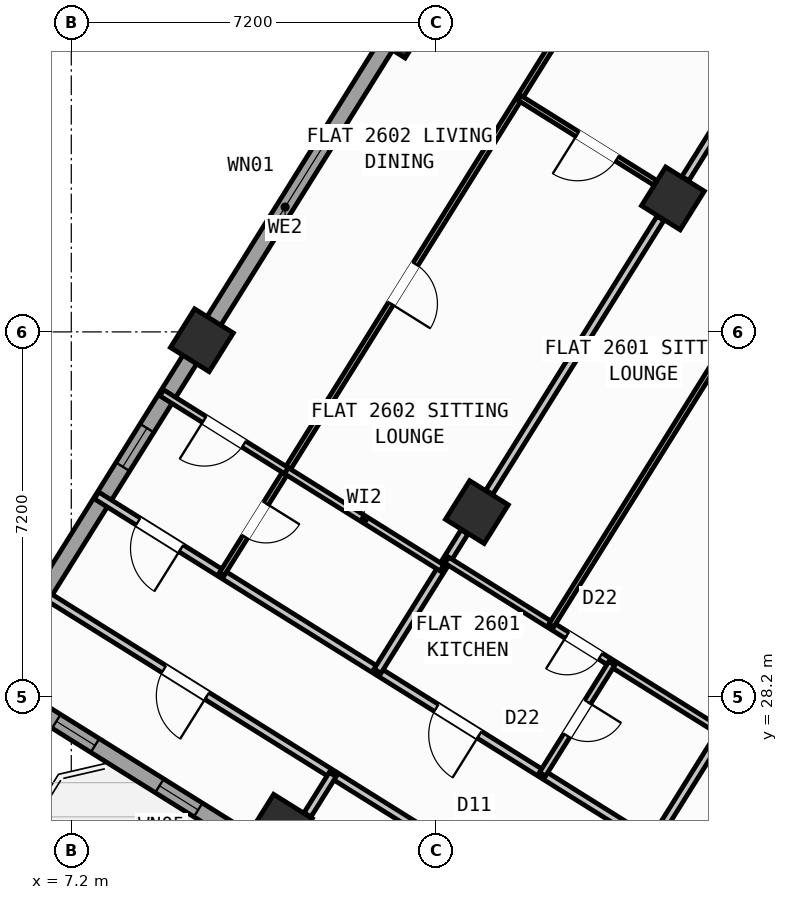
"""IFC4 building model, lengths in metres.
Left out: names, types, materials, properties, quantities, classifications, styles, units other than length and angle.
Written with IfcOpenShell. Run it as: python <this file> out.ifc"""

import sys

from ifc_helpers import new_model, si_unit, direction, frame, frame_2d, origin, origin_2d, place, context, subcontext, project, spatial, rectangle, hollow_rectangle, extrude, source, transform, mapped, element, fill, save


model = new_model("IFC4")
c1 = context("Model", 3, precision=1e-05, world=origin(), true_north=direction((0.0, 1.0)))
c2 = subcontext(c1, "Body", "Model", "MODEL_VIEW")
j1 = project(units=[si_unit("LENGTHUNIT", "METRE"), si_unit("PLANEANGLEUNIT", "RADIAN")], contexts=[c1])
p1 = place(None, origin())
s1 = spatial("IfcSite", under=j1, at=p1, CompositionType="ELEMENT")
p2 = place(p1, origin())
s2 = spatial("IfcBuilding", under=s1, at=p2, CompositionType="ELEMENT")
p3 = place(p2, frame((0.0, 0.0, 105.3)))
s3 = spatial("IfcBuildingStorey", under=s2, at=p3, CompositionType="ELEMENT", Elevation=105.3)
m1 = source(origin(), c2, "Body", "SweptSolid", [
    extrude(hollow_rectangle(XDim=0.9, YDim=0.9, WallThickness=0.036, at=origin_2d()), origin(), (0.0, 0.0, 1.0), 3.6),
])
for number, where, z_axis, x_axis in (
    (1, (19.073, 38.034, 0.0), (0.0, 0.0, 1.0), (-0.848, 0.53, 0.0)),
    (2, (15.205, 31.844, 0.0), (0.0, 0.0, 1.0), (-0.848, 0.53, 0.0)),
    (3, (11.336, 25.653, 0.0), (0.0, 0.0, 1.0), (-0.848, 0.53, 0.0)),
    (4, (13.646, 41.426, 0.0), (0.0, 0.0, 1.0), (-0.848, 0.53, 0.0)),
    (5, (9.777, 35.235, 0.0), (0.0, 0.0, 1.0), (-0.848, 0.53, 0.0)),
):
    element("IfcColumn", number, at=place(p3, frame(where, z_axis=z_axis, x_axis=x_axis)), inside=s3, PredefinedType="COLUMN", context=c2, shape_type="MappedRepresentation", body=[
        mapped(m1, transform((0.0, 0.0, 0.0), scale=1.0)),
    ])
p4 = place(p3, frame((31.76, 12.183, 0.0), z_axis=(0.0, 0.0, 1.0), x_axis=(-0.848047074256, 0.529920899612, 0.0)))
e6 = element("IfcWall", 6, at=p4, inside=s3, PredefinedType="STANDARD", context=c2, shape_type="SweptSolid", body=[
    extrude(rectangle(XDim=30.652, YDim=0.32, at=frame_2d((15.326, 0.0))), origin(), (0.0, 0.0, 1.0), 3.35),
])
p5 = place(p4, frame((15.153, 0.0, 0.0)))
e7 = element("IfcOpeningElement", 7, at=p5, cuts=e6, PredefinedType="OPENING", context=c2, shape_type="SweptSolid", body=[
    extrude(rectangle(XDim=1.2, YDim=2.15, at=frame_2d((0.6, 1.075))), frame((0.0, 0.17, 0.0), z_axis=(0.0, -1.0, 0.0), x_axis=(1.0, 0.0, 0.0)), (0.0, 0.0, 1.0), 0.34),
])
p6 = place(p4, frame((2.002, 0.0, 0.8)))
e8 = element("IfcOpeningElement", 8, at=p6, cuts=e6, PredefinedType="OPENING", context=c2, shape_type="SweptSolid", body=[
    extrude(rectangle(XDim=2.1, YDim=1.55, at=frame_2d((1.05, 0.775))), frame((0.0, 0.17, 0.0), z_axis=(0.0, -1.0, 0.0), x_axis=(1.0, 0.0, 0.0)), (0.0, 0.0, 1.0), 0.34),
])
p7 = place(p4, frame((7.206, 0.0, 0.8)))
e9 = element("IfcOpeningElement", 9, at=p7, cuts=e6, PredefinedType="OPENING", context=c2, shape_type="SweptSolid", body=[
    extrude(rectangle(XDim=2.1, YDim=1.55, at=frame_2d((1.05, 0.775))), frame((0.0, 0.17, 0.0), z_axis=(0.0, -1.0, 0.0), x_axis=(1.0, 0.0, 0.0)), (0.0, 0.0, 1.0), 0.34),
])
p8 = place(p4, frame((12.648, 0.0, 1.0)))
e10 = element("IfcOpeningElement", 10, at=p8, cuts=e6, PredefinedType="OPENING", context=c2, shape_type="SweptSolid", body=[
    extrude(rectangle(XDim=0.9, YDim=1.25, at=frame_2d((0.45, 0.625))), frame((0.0, 0.17, 0.0), z_axis=(0.0, -1.0, 0.0), x_axis=(1.0, 0.0, 0.0)), (0.0, 0.0, 1.0), 0.34),
])
p9 = place(p4, frame((20.628, 0.0, 0.95)))
e11 = element("IfcOpeningElement", 11, at=p9, cuts=e6, PredefinedType="OPENING", context=c2, shape_type="SweptSolid", body=[
    extrude(rectangle(XDim=1.2, YDim=1.4, at=frame_2d((0.6, 0.7))), frame((0.0, 0.17, 0.0), z_axis=(0.0, -1.0, 0.0), x_axis=(1.0, 0.0, 0.0)), (0.0, 0.0, 1.0), 0.34),
])
p10 = place(p4, frame((26.008, 0.0, 1.0)))
e12 = element("IfcOpeningElement", 12, at=p10, cuts=e6, PredefinedType="OPENING", context=c2, shape_type="SweptSolid", body=[
    extrude(rectangle(XDim=0.9, YDim=1.25, at=frame_2d((0.45, 0.625))), frame((0.0, 0.17, 0.0), z_axis=(0.0, -1.0, 0.0), x_axis=(1.0, 0.0, 0.0)), (0.0, 0.0, 1.0), 0.34),
])
p11 = place(p4, frame((28.408, 0.0, 1.0)))
e13 = element("IfcOpeningElement", 13, at=p11, cuts=e6, PredefinedType="OPENING", context=c2, shape_type="SweptSolid", body=[
    extrude(rectangle(XDim=0.9, YDim=1.25, at=frame_2d((0.45, 0.625))), frame((0.0, 0.17, 0.0), z_axis=(0.0, -1.0, 0.0), x_axis=(1.0, 0.0, 0.0)), (0.0, 0.0, 1.0), 0.34),
])
p12 = place(p3, frame((5.7, 28.71, 0.0), z_axis=(0.0, 0.0, 1.0), x_axis=(0.529923711467, 0.8480453172, 0.0)))
e14 = element("IfcWall", 14, at=p12, inside=s3, PredefinedType="STANDARD", context=c2, shape_type="SweptSolid", body=[
    extrude(rectangle(XDim=21.587, YDim=0.32, at=frame_2d((10.794, 0.0))), origin(), (0.0, 0.0, 1.0), 2.775),
])
p13 = place(p12, frame((4.749, 0.0, 1.0)))
e15 = element("IfcOpeningElement", 15, at=p13, cuts=e14, PredefinedType="OPENING", context=c2, shape_type="SweptSolid", body=[
    extrude(rectangle(XDim=0.9, YDim=1.25, at=frame_2d((0.45, 0.625))), frame((0.0, 0.17, 0.0), z_axis=(0.0, -1.0, 0.0), x_axis=(1.0, 0.0, 0.0)), (0.0, 0.0, 1.0), 0.34),
])
p14 = place(p12, frame((10.444, 0.0, 0.85)))
e16 = element("IfcOpeningElement", 16, at=p14, cuts=e14, PredefinedType="OPENING", context=c2, shape_type="SweptSolid", body=[
    extrude(rectangle(XDim=1.8, YDim=1.5, at=frame_2d((0.9, 0.75))), frame((0.0, 0.17, 0.0), z_axis=(0.0, -1.0, 0.0), x_axis=(1.0, 0.0, 0.0)), (0.0, 0.0, 1.0), 0.34),
])
p15 = place(p12, frame((17.406, 0.0, 0.85)))
e17 = element("IfcOpeningElement", 17, at=p15, cuts=e14, PredefinedType="OPENING", context=c2, shape_type="SweptSolid", body=[
    extrude(rectangle(XDim=1.5, YDim=1.5, at=frame_2d((0.75, 0.75))), frame((0.0, 0.17, 0.0), z_axis=(0.0, -1.0, 0.0), x_axis=(1.0, 0.0, 0.0)), (0.0, 0.0, 1.0), 0.34),
])
p16 = place(p3, frame((17.424, 47.083, 0.0), z_axis=(0.0, 0.0, 1.0), x_axis=(0.848049927979, -0.529916332693, 0.0)))
e18 = element("IfcWall", 18, at=p16, inside=s3, PredefinedType="STANDARD", context=c2, shape_type="SweptSolid", body=[
    extrude(rectangle(XDim=29.223, YDim=0.32, at=frame_2d((14.612, 0.0))), origin(), (0.0, 0.0, 1.0), 3.35),
])
p17 = place(p16, frame((3.709, 0.0, 0.0)))
e19 = element("IfcOpeningElement", 19, at=p17, cuts=e18, PredefinedType="OPENING", context=c2, shape_type="SweptSolid", body=[
    extrude(rectangle(XDim=1.05, YDim=2.15, at=frame_2d((0.525, 1.075))), frame((0.0, 0.17, 0.0), z_axis=(0.0, -1.0, 0.0), x_axis=(1.0, 0.0, 0.0)), (0.0, 0.0, 1.0), 0.34),
])
p18 = place(p16, frame((0.659, 0.0, 0.95)))
e20 = element("IfcOpeningElement", 20, at=p18, cuts=e18, PredefinedType="OPENING", context=c2, shape_type="SweptSolid", body=[
    extrude(rectangle(XDim=1.2, YDim=1.4, at=frame_2d((0.6, 0.7))), frame((0.0, 0.17, 0.0), z_axis=(0.0, -1.0, 0.0), x_axis=(1.0, 0.0, 0.0)), (0.0, 0.0, 1.0), 0.34),
])
p19 = place(p16, frame((6.972, 0.0, 1.0)))
e21 = element("IfcOpeningElement", 21, at=p19, cuts=e18, PredefinedType="OPENING", context=c2, shape_type="SweptSolid", body=[
    extrude(rectangle(XDim=0.9, YDim=1.25, at=frame_2d((0.45, 0.625))), frame((0.0, 0.17, 0.0), z_axis=(0.0, -1.0, 0.0), x_axis=(1.0, 0.0, 0.0)), (0.0, 0.0, 1.0), 0.34),
])
p20 = place(p16, frame((9.847, 0.0, 0.85)))
e22 = element("IfcOpeningElement", 22, at=p20, cuts=e18, PredefinedType="OPENING", context=c2, shape_type="SweptSolid", body=[
    extrude(rectangle(XDim=1.5, YDim=1.5, at=frame_2d((0.75, 0.75))), frame((0.0, 0.17, 0.0), z_axis=(0.0, -1.0, 0.0), x_axis=(1.0, 0.0, 0.0)), (0.0, 0.0, 1.0), 0.34),
])
p21 = place(p16, frame((13.889, 0.0, 0.95)))
e23 = element("IfcOpeningElement", 23, at=p21, cuts=e18, PredefinedType="OPENING", context=c2, shape_type="SweptSolid", body=[
    extrude(rectangle(XDim=1.2, YDim=1.4, at=frame_2d((0.6, 0.7))), frame((0.0, 0.17, 0.0), z_axis=(0.0, -1.0, 0.0), x_axis=(1.0, 0.0, 0.0)), (0.0, 0.0, 1.0), 0.34),
])
p22 = place(p16, frame((17.254, 0.0, 1.0)))
e24 = element("IfcOpeningElement", 24, at=p22, cuts=e18, PredefinedType="OPENING", context=c2, shape_type="SweptSolid", body=[
    extrude(rectangle(XDim=0.9, YDim=1.25, at=frame_2d((0.45, 0.625))), frame((0.0, 0.17, 0.0), z_axis=(0.0, -1.0, 0.0), x_axis=(1.0, 0.0, 0.0)), (0.0, 0.0, 1.0), 0.34),
])
p23 = place(p16, frame((20.764, 0.0, 0.8)))
e25 = element("IfcOpeningElement", 25, at=p23, cuts=e18, PredefinedType="OPENING", context=c2, shape_type="SweptSolid", body=[
    extrude(rectangle(XDim=2.1, YDim=1.55, at=frame_2d((1.05, 0.775))), frame((0.0, 0.17, 0.0), z_axis=(0.0, -1.0, 0.0), x_axis=(1.0, 0.0, 0.0)), (0.0, 0.0, 1.0), 0.34),
])
p24 = place(p16, frame((25.403, 0.0, 0.8)))
e26 = element("IfcOpeningElement", 26, at=p24, cuts=e18, PredefinedType="OPENING", context=c2, shape_type="SweptSolid", body=[
    extrude(rectangle(XDim=2.1, YDim=1.55, at=frame_2d((1.05, 0.775))), frame((0.0, 0.17, 0.0), z_axis=(0.0, -1.0, 0.0), x_axis=(1.0, 0.0, 0.0)), (0.0, 0.0, 1.0), 0.34),
])
p25 = place(p3, frame((21.885, 23.306, 0.0), z_axis=(0.0, 0.0, 1.0), x_axis=(-0.848052408131, 0.529912363569, 0.0)))
e27 = element("IfcWall", 27, at=p25, inside=s3, PredefinedType="PARTITIONING", context=c2, shape_type="SweptSolid", body=[
    extrude(rectangle(XDim=16.73, YDim=0.16, at=frame_2d((8.365, 0.0))), origin(), (0.0, 0.0, 1.0), 3.34),
])
p26 = place(p25, frame((1.395, 0.0, 0.0)))
e28 = element("IfcOpeningElement", 28, at=p26, cuts=e27, PredefinedType="OPENING", context=c2, shape_type="SweptSolid", body=[
    extrude(rectangle(XDim=1.0, YDim=2.1, at=frame_2d((0.5, 1.05))), frame((0.0, 0.09, 0.0), z_axis=(0.0, -1.0, 0.0), x_axis=(1.0, 0.0, 0.0)), (0.0, 0.0, 1.0), 0.18),
])
p27 = place(p25, frame((7.82, 0.0, 0.0)))
e29 = element("IfcOpeningElement", 29, at=p27, cuts=e27, PredefinedType="OPENING", context=c2, shape_type="SweptSolid", body=[
    extrude(rectangle(XDim=1.0, YDim=2.1, at=frame_2d((0.5, 1.05))), frame((0.0, 0.09, 0.0), z_axis=(0.0, -1.0, 0.0), x_axis=(1.0, 0.0, 0.0)), (0.0, 0.0, 1.0), 0.18),
])
p28 = place(p25, frame((14.76, 0.0, 0.0)))
e30 = element("IfcOpeningElement", 30, at=p28, cuts=e27, PredefinedType="OPENING", context=c2, shape_type="SweptSolid", body=[
    extrude(rectangle(XDim=1.0, YDim=2.1, at=frame_2d((0.5, 1.05))), frame((0.0, 0.09, 0.0), z_axis=(0.0, -1.0, 0.0), x_axis=(1.0, 0.0, 0.0)), (0.0, 0.0, 1.0), 0.18),
])
p29 = place(p3, frame((20.719, 21.44, 0.0), z_axis=(0.0, 0.0, 1.0), x_axis=(-0.848048310262, 0.529918921593, 0.0)))
e31 = element("IfcWall", 31, at=p29, inside=s3, PredefinedType="PARTITIONING", context=c2, shape_type="SweptSolid", body=[
    extrude(rectangle(XDim=16.73, YDim=0.16, at=frame_2d((8.365, 0.0))), origin(), (0.0, 0.0, 1.0), 3.34),
])
p30 = place(p29, frame((1.505, 0.0, 0.0)))
e32 = element("IfcOpeningElement", 32, at=p30, cuts=e31, PredefinedType="OPENING", context=c2, shape_type="SweptSolid", body=[
    extrude(rectangle(XDim=1.0, YDim=2.1, at=frame_2d((0.5, 1.05))), frame((0.0, 0.09, 0.0), z_axis=(0.0, -1.0, 0.0), x_axis=(1.0, 0.0, 0.0)), (0.0, 0.0, 1.0), 0.18),
])
p31 = place(p29, frame((6.435, 0.0, 0.0)))
e33 = element("IfcOpeningElement", 33, at=p31, cuts=e31, PredefinedType="OPENING", context=c2, shape_type="SweptSolid", body=[
    extrude(rectangle(XDim=1.0, YDim=2.1, at=frame_2d((0.5, 1.05))), frame((0.0, 0.09, 0.0), z_axis=(0.0, -1.0, 0.0), x_axis=(1.0, 0.0, 0.0)), (0.0, 0.0, 1.0), 0.18),
])
p32 = place(p29, frame((12.784, 0.0, 0.0)))
e34 = element("IfcOpeningElement", 34, at=p32, cuts=e31, PredefinedType="OPENING", context=c2, shape_type="SweptSolid", body=[
    extrude(rectangle(XDim=1.0, YDim=2.1, at=frame_2d((0.5, 1.05))), frame((0.0, 0.09, 0.0), z_axis=(0.0, -1.0, 0.0), x_axis=(1.0, 0.0, 0.0)), (0.0, 0.0, 1.0), 0.18),
])
p33 = place(p3, frame((12.359, 26.665, 0.0), z_axis=(0.0, 0.0, 1.0), x_axis=(-0.529835187763, -0.848100627171, 0.0)))
e35 = element("IfcWall", 35, at=p33, inside=s3, PredefinedType="PARTITIONING", context=c2, shape_type="SweptSolid", body=[
    extrude(rectangle(XDim=0.938, YDim=0.16, at=frame_2d((0.469, 0.0))), origin(), (0.0, 0.0, 1.0), 3.34),
])
p34 = place(p3, frame((20.387, 28.06, 0.0), z_axis=(0.0, 0.0, 1.0), x_axis=(-0.529890499457, -0.848066069705, 0.0)))
e36 = element("IfcWall", 36, at=p34, inside=s3, PredefinedType="PARTITIONING", context=c2, shape_type="SweptSolid", body=[
    extrude(rectangle(XDim=3.238, YDim=0.16, at=frame_2d((1.619, 0.0))), origin(), (0.0, 0.0, 1.0), 2.775),
])
p35 = place(p3, frame((22.18, 43.006, 0.0), z_axis=(0.0, 0.0, 1.0), x_axis=(-0.529913610495, -0.848051628978, 0.0)))
e37 = element("IfcWall", 37, at=p35, inside=s3, PredefinedType="PARTITIONING", context=c2, shape_type="SweptSolid", body=[
    extrude(rectangle(XDim=5.401, YDim=0.16, at=frame_2d((2.7, 0.0))), origin(), (0.0, 0.0, 1.0), 2.775),
])
p36 = place(p3, frame((18.828, 37.643, 0.0), z_axis=(0.0, 0.0, 1.0), x_axis=(-0.529930102756, -0.848041323399, 0.0)))
e38 = element("IfcWall", 38, at=p36, inside=s3, PredefinedType="PARTITIONING", context=c2, shape_type="SweptSolid", body=[
    extrude(rectangle(XDim=6.376, YDim=0.16, at=frame_2d((3.188, 0.0))), origin(), (0.0, 0.0, 1.0), 2.775),
])
p37 = place(p3, frame((14.96, 31.452, 0.0), z_axis=(0.0, 0.0, 1.0), x_axis=(-0.529924383291, -0.848044897393, 0.0)))
e39 = element("IfcWall", 39, at=p37, inside=s3, PredefinedType="PARTITIONING", context=c2, shape_type="SweptSolid", body=[
    extrude(rectangle(XDim=3.238, YDim=0.16, at=frame_2d((1.619, 0.0))), origin(), (0.0, 0.0, 1.0), 2.775),
])
p38 = place(p3, frame((20.039, 27.502, 0.0), z_axis=(0.0, 0.0, 1.0), x_axis=(-0.848039019877, 0.529933789039, 0.0)))
e40 = element("IfcWall", 40, at=p38, inside=s3, PredefinedType="PLUMBINGWALL", context=c2, shape_type="SweptSolid", body=[
    extrude(rectangle(XDim=6.4, YDim=0.14, at=frame_2d((3.2, 0.0))), origin(), (0.0, 0.0, 1.0), 3.34),
])
p39 = place(p38, frame((2.824, 0.0, 0.0)))
e41 = element("IfcOpeningElement", 41, at=p39, cuts=e40, PredefinedType="OPENING", context=c2, shape_type="SweptSolid", body=[
    extrude(rectangle(XDim=0.78, YDim=2.05, at=frame_2d((0.39, 1.025))), frame((0.0, 0.08, 0.0), z_axis=(0.0, -1.0, 0.0), x_axis=(1.0, 0.0, 0.0)), (0.0, 0.0, 1.0), 0.16),
])
p40 = place(p3, frame((17.867, 28.859, 0.0), z_axis=(0.0, 0.0, 1.0), x_axis=(-0.529913878929, -0.848051461244, 0.0)))
e42 = element("IfcWall", 42, at=p40, inside=s3, PredefinedType="PLUMBINGWALL", context=c2, shape_type="SweptSolid", body=[
    extrude(rectangle(XDim=2.58, YDim=0.14, at=frame_2d((1.29, 0.0))), origin(), (0.0, 0.0, 1.0), 3.34),
])
p41 = place(p40, frame((0.9, 0.0, 0.0)))
e43 = element("IfcOpeningElement", 43, at=p41, cuts=e42, PredefinedType="OPENING", context=c2, shape_type="SweptSolid", body=[
    extrude(rectangle(XDim=0.78, YDim=2.05, at=frame_2d((0.39, 1.025))), frame((0.0, 0.08, 0.0), z_axis=(0.0, -1.0, 0.0), x_axis=(1.0, 0.0, 0.0)), (0.0, 0.0, 1.0), 0.16),
])
p42 = place(p3, frame((24.802, 42.614, 0.0), z_axis=(0.0, 0.0, 1.0), x_axis=(-0.529928839727, -0.848042112649, 0.0)))
e44 = element("IfcWall", 44, at=p42, inside=s3, PredefinedType="PARTITIONING", context=c2, shape_type="SweptSolid", body=[
    extrude(rectangle(XDim=15.34, YDim=0.11, at=frame_2d((7.67, 0.0))), origin(), (0.0, 0.0, 1.0), 3.34),
])
p43 = place(p42, frame((0.47, 0.0, 0.0)))
e45 = element("IfcOpeningElement", 45, at=p43, cuts=e44, PredefinedType="OPENING", context=c2, shape_type="SweptSolid", body=[
    extrude(rectangle(XDim=0.92, YDim=2.08, at=frame_2d((0.46, 1.04))), frame((0.0, 0.065, 0.0), z_axis=(0.0, -1.0, 0.0), x_axis=(1.0, 0.0, 0.0)), (0.0, 0.0, 1.0), 0.13),
])
p44 = place(p3, frame((19.67, 45.821, 0.0), z_axis=(0.0, 0.0, 1.0), x_axis=(-0.529916887708, -0.848049581169, 0.0)))
e46 = element("IfcWall", 46, at=p44, inside=s3, PredefinedType="PARTITIONING", context=c2, shape_type="SweptSolid", body=[
    extrude(rectangle(XDim=17.92, YDim=0.11, at=frame_2d((8.96, 0.0))), origin(), (0.0, 0.0, 1.0), 3.34),
])
p45 = place(p44, frame((16.28, 0.0, 0.0)))
e47 = element("IfcOpeningElement", 47, at=p45, cuts=e46, PredefinedType="OPENING", context=c2, shape_type="SweptSolid", body=[
    extrude(rectangle(XDim=0.78, YDim=2.05, at=frame_2d((0.39, 1.025))), frame((0.0, 0.065, 0.0), z_axis=(0.0, -1.0, 0.0), x_axis=(1.0, 0.0, 0.0)), (0.0, 0.0, 1.0), 0.13),
])
p46 = place(p44, frame((10.711, 0.0, 0.0)))
e48 = element("IfcOpeningElement", 48, at=p46, cuts=e46, PredefinedType="OPENING", context=c2, shape_type="SweptSolid", body=[
    extrude(rectangle(XDim=0.92, YDim=2.08, at=frame_2d((0.46, 1.04))), frame((0.0, 0.065, 0.0), z_axis=(0.0, -1.0, 0.0), x_axis=(1.0, 0.0, 0.0)), (0.0, 0.0, 1.0), 0.13),
])
p47 = place(p3, frame((11.446, 32.659, 0.0), z_axis=(0.0, 0.0, 1.0), x_axis=(-0.848045593671, 0.529923269025, 0.0)))
e49 = element("IfcWall", 49, at=p47, inside=s3, PredefinedType="PLUMBINGWALL", context=c2, shape_type="SweptSolid", body=[
    extrude(rectangle(XDim=2.9, YDim=0.14, at=frame_2d((1.45, 0.0))), origin(), (0.0, 0.0, 1.0), 3.34),
])
p48 = place(p47, frame((0.99, 0.0, 0.0)))
e50 = element("IfcOpeningElement", 50, at=p48, cuts=e49, PredefinedType="OPENING", context=c2, shape_type="SweptSolid", body=[
    extrude(rectangle(XDim=0.92, YDim=2.08, at=frame_2d((0.46, 1.04))), frame((0.0, 0.08, 0.0), z_axis=(0.0, -1.0, 0.0), x_axis=(1.0, 0.0, 0.0)), (0.0, 0.0, 1.0), 0.16),
])
p49 = place(p3, frame((14.516, 30.741, 0.0), z_axis=(0.0, 0.0, 1.0), x_axis=(-0.848051346257, 0.52991406295, 0.0)))
e51 = element("IfcWall", 51, at=p49, inside=s3, PredefinedType="PLUMBINGWALL", context=c2, shape_type="SweptSolid", body=[
    extrude(rectangle(XDim=3.62, YDim=0.14, at=frame_2d((1.81, 0.0))), origin(), (0.0, 0.0, 1.0), 3.34),
])
p50 = place(p3, frame((18.722, 38.344, 0.0), z_axis=(0.0, 0.0, 1.0), x_axis=(-0.84807647212, 0.529873850493, 0.0)))
e52 = element("IfcWall", 52, at=p50, inside=s3, PredefinedType="PARTITIONING", context=c2, shape_type="SweptSolid", body=[
    extrude(rectangle(XDim=3.158, YDim=0.11, at=frame_2d((1.579, 0.0))), origin(), (0.0, 0.0, 1.0), 2.775),
])
p51 = place(p50, frame((0.888, 0.0, 0.0)))
e53 = element("IfcOpeningElement", 53, at=p51, cuts=e52, PredefinedType="OPENING", context=c2, shape_type="SweptSolid", body=[
    extrude(rectangle(XDim=0.92, YDim=2.08, at=frame_2d((0.46, 1.04))), frame((0.0, 0.065, 0.0), z_axis=(0.0, -1.0, 0.0), x_axis=(1.0, 0.0, 0.0)), (0.0, 0.0, 1.0), 0.13),
])
m2 = source(origin(), c2, "Body", "SweptSolid", [
    extrude(rectangle(XDim=0.9, YDim=1.25, at=frame_2d((0.45, 0.625))), frame((0.0, 0.03, 0.0), z_axis=(0.0, -1.0, 0.0), x_axis=(1.0, 0.0, 0.0)), (0.0, 0.0, 1.0), 0.06),
])
p52 = place(p10, origin())
e54 = element("IfcWindow", 54, at=p52, inside=s3, PartitioningType="SINGLE_PANEL", PredefinedType="WINDOW", context=c2, shape_type="MappedRepresentation", body=[
    mapped(m2, transform((0.0, 0.0, 0.0), scale=1.0)),
])
fill(e12, e54)
p53 = place(p11, origin())
e55 = element("IfcWindow", 55, at=p53, inside=s3, PartitioningType="SINGLE_PANEL", PredefinedType="WINDOW", context=c2, shape_type="MappedRepresentation", body=[
    mapped(m2, transform((0.0, 0.0, 0.0), scale=1.0)),
])
fill(e13, e55)
p54 = place(p13, origin())
e56 = element("IfcWindow", 56, at=p54, inside=s3, PartitioningType="SINGLE_PANEL", PredefinedType="WINDOW", context=c2, shape_type="MappedRepresentation", body=[
    mapped(m2, transform((0.0, 0.0, 0.0), scale=1.0)),
])
fill(e15, e56)
m3 = source(origin(), c2, "Body", "SweptSolid", [
    extrude(rectangle(XDim=1.8, YDim=1.5, at=frame_2d((0.9, 0.75))), frame((0.0, 0.03, 0.0), z_axis=(0.0, -1.0, 0.0), x_axis=(1.0, 0.0, 0.0)), (0.0, 0.0, 1.0), 0.06),
])
p55 = place(p14, origin())
e57 = element("IfcWindow", 57, at=p55, inside=s3, PartitioningType="SINGLE_PANEL", PredefinedType="WINDOW", context=c2, shape_type="MappedRepresentation", body=[
    mapped(m3, transform((0.0, 0.0, 0.0), scale=1.0)),
])
fill(e16, e57)
m4 = source(origin(), c2, "Body", "SweptSolid", [
    extrude(rectangle(XDim=1.0, YDim=2.1, at=frame_2d((0.5, 1.05))), frame((0.0, 0.025, 0.0), z_axis=(0.0, -1.0, 0.0), x_axis=(1.0, 0.0, 0.0)), (0.0, 0.0, 1.0), 0.05),
])
p56 = place(p32, origin())
e58 = element("IfcDoor", 58, at=p56, inside=s3, OperationType="SINGLE_SWING_LEFT", PredefinedType="DOOR", context=c2, shape_type="MappedRepresentation", body=[
    mapped(m4, transform((0.0, 0.0, 0.0), scale=1.0)),
])
fill(e34, e58)
p57 = place(p27, origin())
e59 = element("IfcDoor", 59, at=p57, inside=s3, OperationType="SINGLE_SWING_LEFT", PredefinedType="DOOR", context=c2, shape_type="MappedRepresentation", body=[
    mapped(m4, transform((0.0, 0.0, 0.0), scale=1.0)),
])
fill(e29, e59)
m5 = source(origin(), c2, "Body", "SweptSolid", [
    extrude(rectangle(XDim=0.78, YDim=2.05, at=frame_2d((0.39, 1.025))), frame((0.0, 0.025, 0.0), z_axis=(0.0, -1.0, 0.0), x_axis=(1.0, 0.0, 0.0)), (0.0, 0.0, 1.0), 0.05),
])
p58 = place(p39, origin())
e60 = element("IfcDoor", 60, at=p58, inside=s3, OperationType="SINGLE_SWING_RIGHT", PredefinedType="DOOR", context=c2, shape_type="MappedRepresentation", body=[
    mapped(m5, transform((0.0, 0.0, 0.0), scale=1.0)),
])
fill(e41, e60)
p59 = place(p41, origin())
e61 = element("IfcDoor", 61, at=p59, inside=s3, OperationType="SINGLE_SWING_LEFT", PredefinedType="DOOR", context=c2, shape_type="MappedRepresentation", body=[
    mapped(m5, transform((0.0, 0.0, 0.0), scale=1.0)),
])
fill(e43, e61)
p60 = place(p28, origin())
e62 = element("IfcDoor", 62, at=p60, inside=s3, OperationType="SINGLE_SWING_LEFT", PredefinedType="DOOR", context=c2, shape_type="MappedRepresentation", body=[
    mapped(m4, transform((0.0, 0.0, 0.0), scale=1.0)),
])
fill(e30, e62)
m6 = source(origin(), c2, "Body", "SweptSolid", [
    extrude(rectangle(XDim=0.92, YDim=2.08, at=frame_2d((0.46, 1.04))), frame((0.0, 0.025, 0.0), z_axis=(0.0, -1.0, 0.0), x_axis=(1.0, 0.0, 0.0)), (0.0, 0.0, 1.0), 0.05),
])
p61 = place(p48, origin())
e63 = element("IfcDoor", 63, at=p61, inside=s3, OperationType="SINGLE_SWING_RIGHT", PredefinedType="DOOR", context=c2, shape_type="MappedRepresentation", body=[
    mapped(m6, transform((0.0, 0.0, 0.0), scale=1.0)),
])
fill(e50, e63)
p62 = place(p45, origin())
e64 = element("IfcDoor", 64, at=p62, inside=s3, OperationType="SINGLE_SWING_LEFT", PredefinedType="DOOR", context=c2, shape_type="MappedRepresentation", body=[
    mapped(m5, transform((0.0, 0.0, 0.0), scale=1.0)),
])
fill(e47, e64)
p63 = place(p46, origin())
e65 = element("IfcDoor", 65, at=p63, inside=s3, OperationType="SINGLE_SWING_RIGHT", PredefinedType="DOOR", context=c2, shape_type="MappedRepresentation", body=[
    mapped(m6, transform((0.0, 0.0, 0.0), scale=1.0)),
])
fill(e48, e65)
p64 = place(p51, origin())
e66 = element("IfcDoor", 66, at=p64, inside=s3, OperationType="SINGLE_SWING_RIGHT", PredefinedType="DOOR", context=c2, shape_type="MappedRepresentation", body=[
    mapped(m6, transform((0.0, 0.0, 0.0), scale=1.0)),
])
fill(e53, e66)
save(model, sys.argv[1])
